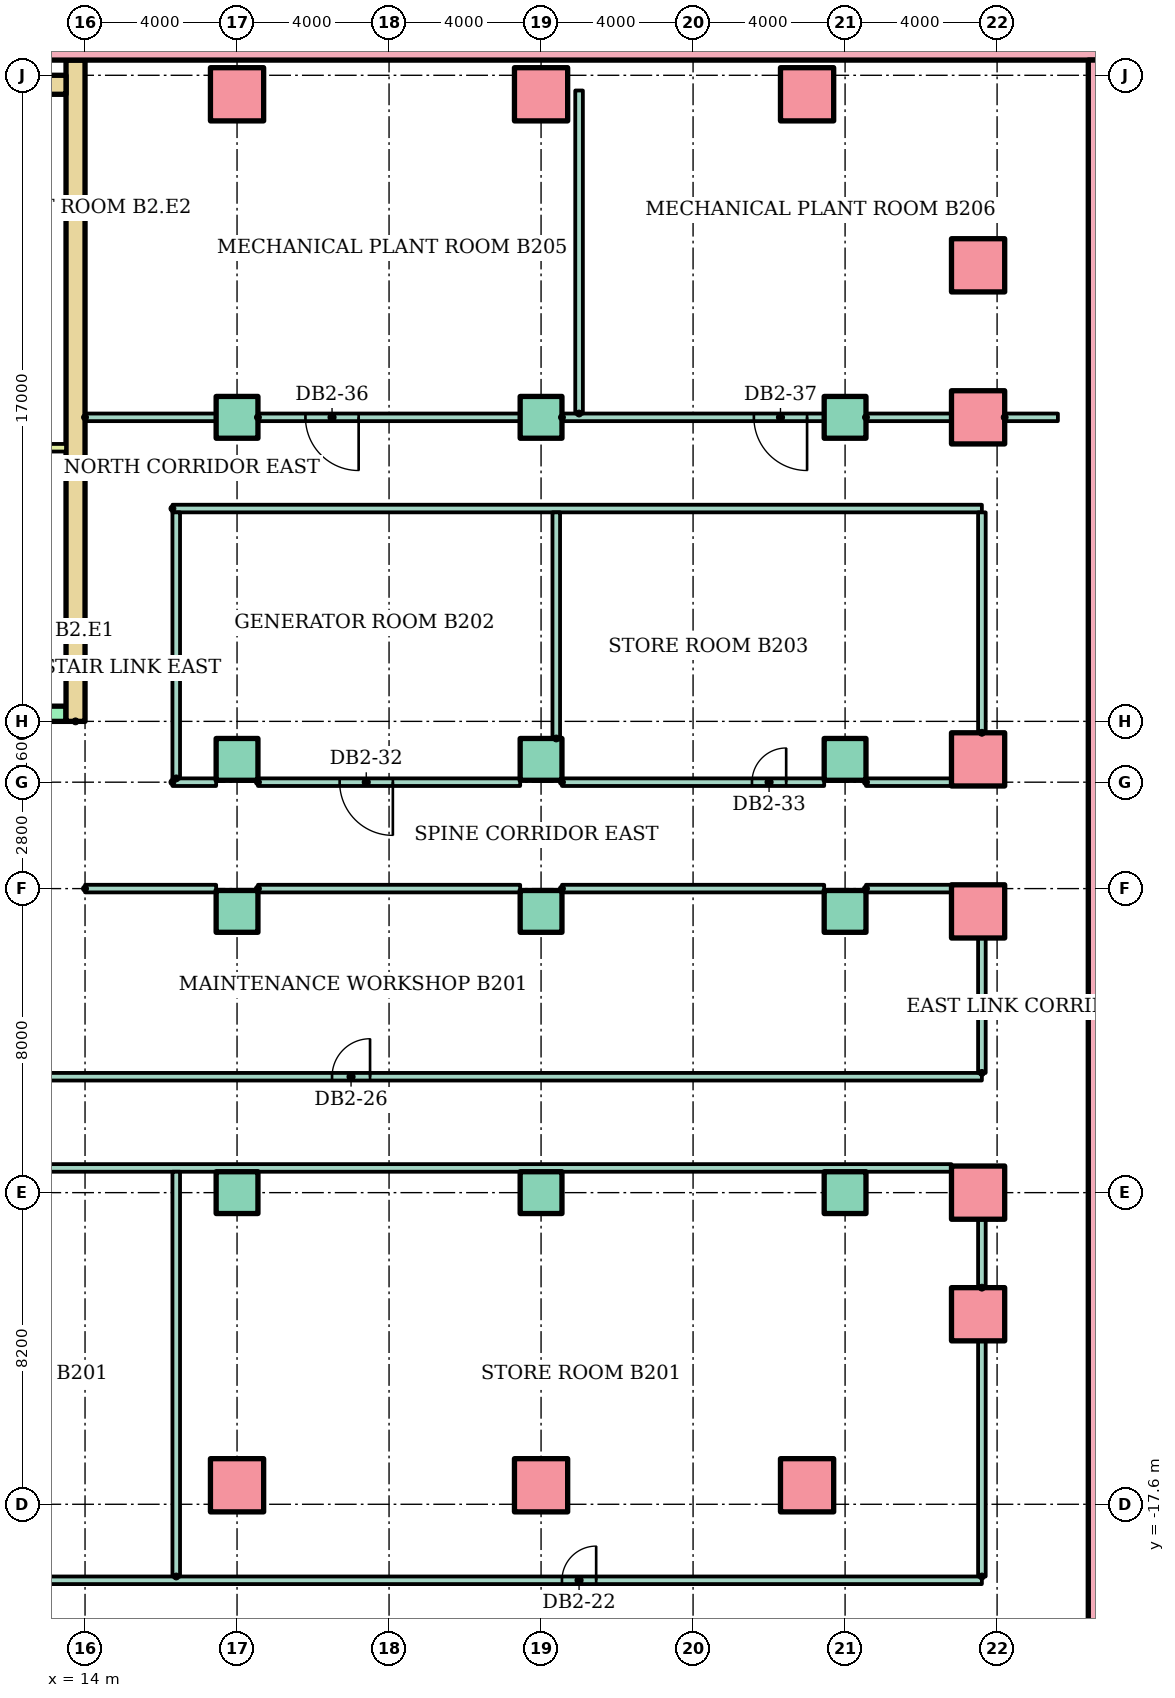
"""IFC4 building model, lengths in metres.
Left out: names, types, materials, properties, quantities, classifications, styles, units other than length and angle.
Written with IfcOpenShell. Run it as: python <this file> out.ifc"""

import sys

from ifc_helpers import new_model, si_unit, direction, frame, frame_2d, origin, origin_2d, place, context, subcontext, project, spatial, rectangle, hollow_rectangle, extrude, element, fill, save


model = new_model("IFC4")
c1 = context("Model", 3, precision=1e-05, world=origin(), true_north=direction((0.0, 1.0)))
c2 = subcontext(c1, "Body", "Model", "MODEL_VIEW")
j1 = project(units=[si_unit("LENGTHUNIT", "METRE"), si_unit("PLANEANGLEUNIT", "RADIAN")], contexts=[c1])
p1 = place(None, origin())
s1 = spatial("IfcSite", under=j1, at=p1, CompositionType="ELEMENT")
p2 = place(p1, origin())
s2 = spatial("IfcBuilding", under=s1, at=p2, CompositionType="ELEMENT")
p3 = place(p2, frame((0.0, 0.0, -10.0)))
s3 = spatial("IfcBuildingStorey", under=s2, at=p3, CompositionType="ELEMENT", Elevation=-10.0)
p4 = place(p3, frame((-41.0, 20.7, -0.3)))
e1 = element("IfcWall", 1, at=p4, inside=s3, PredefinedType="SOLIDWALL", context=c2, shape_type="SweptSolid", body=[
    extrude(rectangle(XDim=82.0, YDim=0.6, at=frame_2d((41.0, 0.0))), origin(), (0.0, 0.0, 1.0), 4.95),
])
p5 = place(p3, frame((40.7, -50.4, -0.3), z_axis=(0.0, 0.0, 1.0), x_axis=(0.0, 1.0, 0.0)))
e2 = element("IfcWall", 2, at=p5, inside=s3, PredefinedType="SOLIDWALL", context=c2, shape_type="SweptSolid", body=[
    extrude(rectangle(XDim=70.8, YDim=0.6, at=frame_2d((35.4, 0.0))), origin(), (0.0, 0.0, 1.0), 4.95),
])
for number, where in (
    (3, (18.0, -17.1, -0.3)),
    (4, (26.0, -17.1, -0.3)),
    (5, (33.0, -17.1, -0.3)),
    (6, (37.5, -12.6, -0.3)),
):
    element("IfcColumn", number, at=place(p3, frame(where)), inside=s3, PredefinedType="COLUMN", context=c2, shape_type="SweptSolid", body=[
        extrude(hollow_rectangle(XDim=1.4, YDim=1.4, WallThickness=0.08, at=origin_2d()), origin(), (0.0, 0.0, 1.0), 5.3),
    ])
for number, where in (
    (7, (18.0, -9.4, -0.3)),
    (8, (26.0, -9.4, -0.3)),
    (9, (34.0, -9.4, -0.3)),
):
    element("IfcColumn", number, at=place(p3, frame(where)), inside=s3, PredefinedType="COLUMN", context=c2, shape_type="SweptSolid", body=[
        extrude(rectangle(XDim=1.1, YDim=1.1, at=origin_2d()), origin(), (0.0, 0.0, 1.0), 5.3),
    ])
p6 = place(p3, frame((37.5, -9.4, -0.3)))
e10 = element("IfcColumn", 10, at=p6, inside=s3, PredefinedType="COLUMN", context=c2, shape_type="SweptSolid", body=[
    extrude(hollow_rectangle(XDim=1.4, YDim=1.4, WallThickness=0.08, at=origin_2d()), origin(), (0.0, 0.0, 1.0), 5.3),
])
for number, where in (
    (11, (18.0, -2.0, -0.3)),
    (12, (26.0, -2.0, -0.3)),
    (13, (34.0, -2.0, -0.3)),
):
    element("IfcColumn", number, at=place(p3, frame(where)), inside=s3, PredefinedType="COLUMN", context=c2, shape_type="SweptSolid", body=[
        extrude(rectangle(XDim=1.1, YDim=1.1, at=origin_2d()), origin(), (0.0, 0.0, 1.0), 5.3),
    ])
p7 = place(p3, frame((37.5, -2.0, -0.3)))
e14 = element("IfcColumn", 14, at=p7, inside=s3, PredefinedType="COLUMN", context=c2, shape_type="SweptSolid", body=[
    extrude(hollow_rectangle(XDim=1.4, YDim=1.4, WallThickness=0.08, at=origin_2d()), origin(), (0.0, 0.0, 1.0), 5.3),
])
for number, where in (
    (15, (18.0, 2.0, -0.3)),
    (16, (26.0, 2.0, -0.3)),
    (17, (34.0, 2.0, -0.3)),
):
    element("IfcColumn", number, at=place(p3, frame(where)), inside=s3, PredefinedType="COLUMN", context=c2, shape_type="SweptSolid", body=[
        extrude(rectangle(XDim=1.1, YDim=1.1, at=origin_2d()), origin(), (0.0, 0.0, 1.0), 5.3),
    ])
p8 = place(p3, frame((37.5, 2.0, -0.3)))
e18 = element("IfcColumn", 18, at=p8, inside=s3, PredefinedType="COLUMN", context=c2, shape_type="SweptSolid", body=[
    extrude(hollow_rectangle(XDim=1.4, YDim=1.4, WallThickness=0.08, at=origin_2d()), origin(), (0.0, 0.0, 1.0), 5.3),
])
for number, where in (
    (19, (18.0, 11.0, -0.3)),
    (20, (26.0, 11.0, -0.3)),
    (21, (34.0, 11.0, -0.3)),
):
    element("IfcColumn", number, at=place(p3, frame(where)), inside=s3, PredefinedType="COLUMN", context=c2, shape_type="SweptSolid", body=[
        extrude(rectangle(XDim=1.1, YDim=1.1, at=origin_2d()), origin(), (0.0, 0.0, 1.0), 5.3),
    ])
for number, where in (
    (22, (37.5, 11.0, -0.3)),
    (23, (37.5, 15.0, -0.3)),
    (24, (18.0, 19.5, -0.3)),
    (25, (26.0, 19.5, -0.3)),
    (26, (33.0, 19.5, -0.3)),
):
    element("IfcColumn", number, at=place(p3, frame(where)), inside=s3, PredefinedType="COLUMN", context=c2, shape_type="SweptSolid", body=[
        extrude(hollow_rectangle(XDim=1.4, YDim=1.4, WallThickness=0.08, at=origin_2d()), origin(), (0.0, 0.0, 1.0), 5.3),
    ])
p9 = place(p3, frame((13.75, 3.0, 0.0), z_axis=(0.0, 0.0, 1.0), x_axis=(0.0, 1.0, 0.0)))
e27 = element("IfcWall", 27, at=p9, inside=s3, PredefinedType="SHEAR", context=c2, shape_type="SweptSolid", body=[
    extrude(rectangle(XDim=17.4, YDim=0.5, at=frame_2d((8.7, 0.0))), origin(), (0.0, 0.0, 1.0), 4.65),
])
p10 = place(p3, frame((-13.5, 19.75, 0.0)))
e28 = element("IfcWall", 28, at=p10, inside=s3, PredefinedType="SHEAR", context=c2, shape_type="SweptSolid", body=[
    extrude(rectangle(XDim=27.0, YDim=0.5, at=frame_2d((13.5, 0.0))), origin(), (0.0, 0.0, 1.0), 4.65),
])
p11 = place(p3, frame((-13.5, 3.2, 0.0)))
e29 = element("IfcWall", 29, at=p11, inside=s3, PredefinedType="SHEAR", context=c2, shape_type="SweptSolid", body=[
    extrude(rectangle(XDim=27.0, YDim=0.4, at=frame_2d((13.5, 0.0))), origin(), (0.0, 0.0, 1.0), 4.65),
])
p12 = place(p11, frame((12.6, 0.0, 0.0)))
e30 = element("IfcOpeningElement", 30, at=p12, cuts=e29, PredefinedType="OPENING", context=c2, shape_type="SweptSolid", body=[
    extrude(rectangle(XDim=1.8, YDim=2.1, at=frame_2d((0.9, 1.05))), frame((0.0, 0.21, 0.0), z_axis=(0.0, -1.0, 0.0), x_axis=(1.0, 0.0, 0.0)), (0.0, 0.0, 1.0), 0.42),
])
p13 = place(p3, frame((9.6, 10.2, 0.0)))
e31 = element("IfcWall", 31, at=p13, inside=s3, PredefinedType="PARTITIONING", context=c2, shape_type="SweptSolid", body=[
    extrude(rectangle(XDim=3.9, YDim=0.2, at=frame_2d((1.95, 0.0))), origin(), (0.0, 0.0, 1.0), 4.65),
])
p14 = place(p3, frame((-37.6, -19.6, 0.0)))
e32 = element("IfcWall", 32, at=p14, inside=s3, PredefinedType="PARTITIONING", context=c2, shape_type="SweptSolid", body=[
    extrude(rectangle(XDim=75.2, YDim=0.2, at=frame_2d((37.6, 0.0))), origin(), (0.0, 0.0, 1.0), 4.65),
])
p15 = place(p14, frame((9.3, 0.0, 0.0)))
e33 = element("IfcOpeningElement", 33, at=p15, cuts=e32, PredefinedType="OPENING", context=c2, shape_type="SweptSolid", body=[
    extrude(rectangle(XDim=1.4, YDim=2.1, at=frame_2d((0.7, 1.05))), frame((0.0, 0.11, 0.0), z_axis=(0.0, -1.0, 0.0), x_axis=(1.0, 0.0, 0.0)), (0.0, 0.0, 1.0), 0.22),
])
p16 = place(p14, frame((29.3, 0.0, 0.0)))
e34 = element("IfcOpeningElement", 34, at=p16, cuts=e32, PredefinedType="OPENING", context=c2, shape_type="SweptSolid", body=[
    extrude(rectangle(XDim=1.4, YDim=2.1, at=frame_2d((0.7, 1.05))), frame((0.0, 0.11, 0.0), z_axis=(0.0, -1.0, 0.0), x_axis=(1.0, 0.0, 0.0)), (0.0, 0.0, 1.0), 0.22),
])
p17 = place(p14, frame((46.5, 0.0, 0.0)))
e35 = element("IfcOpeningElement", 35, at=p17, cuts=e32, PredefinedType="OPENING", context=c2, shape_type="SweptSolid", body=[
    extrude(rectangle(XDim=1.0, YDim=2.1, at=frame_2d((0.5, 1.05))), frame((0.0, 0.11, 0.0), z_axis=(0.0, -1.0, 0.0), x_axis=(1.0, 0.0, 0.0)), (0.0, 0.0, 1.0), 0.22),
])
p18 = place(p14, frame((64.15, 0.0, 0.0)))
e36 = element("IfcOpeningElement", 36, at=p18, cuts=e32, PredefinedType="OPENING", context=c2, shape_type="SweptSolid", body=[
    extrude(rectangle(XDim=0.9, YDim=2.1, at=frame_2d((0.45, 1.05))), frame((0.0, 0.11, 0.0), z_axis=(0.0, -1.0, 0.0), x_axis=(1.0, 0.0, 0.0)), (0.0, 0.0, 1.0), 0.22),
])
p19 = place(p3, frame((-36.8, -8.75, 0.0)))
e37 = element("IfcWall", 37, at=p19, inside=s3, PredefinedType="PARTITIONING", context=c2, shape_type="SweptSolid", body=[
    extrude(rectangle(XDim=73.6, YDim=0.2, at=frame_2d((36.8, 0.0))), origin(), (0.0, 0.0, 1.0), 4.65),
])
p20 = place(p3, frame((-37.6, -6.35, 0.0)))
e38 = element("IfcWall", 38, at=p20, inside=s3, PredefinedType="PARTITIONING", context=c2, shape_type="SweptSolid", body=[
    extrude(rectangle(XDim=75.2, YDim=0.2, at=frame_2d((37.6, 0.0))), origin(), (0.0, 0.0, 1.0), 4.65),
])
p21 = place(p20, frame((6.5, 0.0, 0.0)))
e39 = element("IfcOpeningElement", 39, at=p21, cuts=e38, PredefinedType="OPENING", context=c2, shape_type="SweptSolid", body=[
    extrude(rectangle(XDim=1.0, YDim=2.1, at=frame_2d((0.5, 1.05))), frame((0.0, 0.11, 0.0), z_axis=(0.0, -1.0, 0.0), x_axis=(1.0, 0.0, 0.0)), (0.0, 0.0, 1.0), 0.22),
])
p22 = place(p20, frame((20.5, 0.0, 0.0)))
e40 = element("IfcOpeningElement", 40, at=p22, cuts=e38, PredefinedType="OPENING", context=c2, shape_type="SweptSolid", body=[
    extrude(rectangle(XDim=1.0, YDim=2.1, at=frame_2d((0.5, 1.05))), frame((0.0, 0.11, 0.0), z_axis=(0.0, -1.0, 0.0), x_axis=(1.0, 0.0, 0.0)), (0.0, 0.0, 1.0), 0.22),
])
p23 = place(p20, frame((34.55, 0.0, 0.0)))
e41 = element("IfcOpeningElement", 41, at=p23, cuts=e38, PredefinedType="OPENING", context=c2, shape_type="SweptSolid", body=[
    extrude(rectangle(XDim=0.9, YDim=2.1, at=frame_2d((0.45, 1.05))), frame((0.0, 0.11, 0.0), z_axis=(0.0, -1.0, 0.0), x_axis=(1.0, 0.0, 0.0)), (0.0, 0.0, 1.0), 0.22),
])
p24 = place(p20, frame((58.1, 0.0, 0.0)))
e42 = element("IfcOpeningElement", 42, at=p24, cuts=e38, PredefinedType="OPENING", context=c2, shape_type="SweptSolid", body=[
    extrude(rectangle(XDim=1.0, YDim=2.1, at=frame_2d((0.5, 1.05))), frame((0.0, 0.11, 0.0), z_axis=(0.0, -1.0, 0.0), x_axis=(1.0, 0.0, 0.0)), (0.0, 0.0, 1.0), 0.22),
])
p25 = place(p3, frame((14.0, -1.4, 0.0)))
e43 = element("IfcWall", 43, at=p25, inside=s3, PredefinedType="PARTITIONING", context=c2, shape_type="SweptSolid", body=[
    extrude(rectangle(XDim=3.45, YDim=0.2, at=frame_2d((1.725, 0.0))), origin(), (0.0, 0.0, 1.0), 4.65),
])
for number, where in (
    (44, (18.55, -1.4, 0.0)),
    (45, (26.55, -1.4, 0.0)),
):
    element("IfcWall", number, at=place(p3, frame(where)), inside=s3, PredefinedType="PARTITIONING", context=c2, shape_type="SweptSolid", body=[
        extrude(rectangle(XDim=6.9, YDim=0.2, at=frame_2d((3.45, 0.0))), origin(), (0.0, 0.0, 1.0), 4.65),
    ])
p26 = place(p3, frame((34.55, -1.4, 0.0)))
e46 = element("IfcWall", 46, at=p26, inside=s3, PredefinedType="PARTITIONING", context=c2, shape_type="SweptSolid", body=[
    extrude(rectangle(XDim=2.25, YDim=0.2, at=frame_2d((1.125, 0.0))), origin(), (0.0, 0.0, 1.0), 4.65),
])
p27 = place(p3, frame((16.3, 1.4, 0.0)))
e47 = element("IfcWall", 47, at=p27, inside=s3, PredefinedType="PARTITIONING", context=c2, shape_type="SweptSolid", body=[
    extrude(rectangle(XDim=1.15, YDim=0.2, at=frame_2d((0.575, 0.0))), origin(), (0.0, 0.0, 1.0), 4.65),
])
p28 = place(p3, frame((18.55, 1.4, 0.0)))
e48 = element("IfcWall", 48, at=p28, inside=s3, PredefinedType="PARTITIONING", context=c2, shape_type="SweptSolid", body=[
    extrude(rectangle(XDim=6.9, YDim=0.2, at=frame_2d((3.45, 0.0))), origin(), (0.0, 0.0, 1.0), 4.65),
])
p29 = place(p28, frame((2.15, 0.0, 0.0)))
e49 = element("IfcOpeningElement", 49, at=p29, cuts=e48, PredefinedType="OPENING", context=c2, shape_type="SweptSolid", body=[
    extrude(rectangle(XDim=1.4, YDim=2.1, at=frame_2d((0.7, 1.05))), frame((0.0, 0.11, 0.0), z_axis=(0.0, -1.0, 0.0), x_axis=(1.0, 0.0, 0.0)), (0.0, 0.0, 1.0), 0.22),
])
p30 = place(p3, frame((26.55, 1.4, 0.0)))
e50 = element("IfcWall", 50, at=p30, inside=s3, PredefinedType="PARTITIONING", context=c2, shape_type="SweptSolid", body=[
    extrude(rectangle(XDim=6.9, YDim=0.2, at=frame_2d((3.45, 0.0))), origin(), (0.0, 0.0, 1.0), 4.65),
])
p31 = place(p30, frame((5.0, 0.0, 0.0)))
e51 = element("IfcOpeningElement", 51, at=p31, cuts=e50, PredefinedType="OPENING", context=c2, shape_type="SweptSolid", body=[
    extrude(rectangle(XDim=0.9, YDim=2.1, at=frame_2d((0.45, 1.05))), frame((0.0, 0.11, 0.0), z_axis=(0.0, -1.0, 0.0), x_axis=(1.0, 0.0, 0.0)), (0.0, 0.0, 1.0), 0.22),
])
p32 = place(p3, frame((34.55, 1.4, 0.0)))
e52 = element("IfcWall", 52, at=p32, inside=s3, PredefinedType="PARTITIONING", context=c2, shape_type="SweptSolid", body=[
    extrude(rectangle(XDim=2.25, YDim=0.2, at=frame_2d((1.125, 0.0))), origin(), (0.0, 0.0, 1.0), 4.65),
])
p33 = place(p3, frame((16.3, 8.6, 0.0)))
e53 = element("IfcWall", 53, at=p33, inside=s3, PredefinedType="PARTITIONING", context=c2, shape_type="SweptSolid", body=[
    extrude(rectangle(XDim=21.3, YDim=0.2, at=frame_2d((10.65, 0.0))), origin(), (0.0, 0.0, 1.0), 4.65),
])
p34 = place(p3, frame((14.0, 11.0, 0.0)))
e54 = element("IfcWall", 54, at=p34, inside=s3, PredefinedType="PARTITIONING", context=c2, shape_type="SweptSolid", body=[
    extrude(rectangle(XDim=3.45, YDim=0.2, at=frame_2d((1.725, 0.0))), origin(), (0.0, 0.0, 1.0), 4.65),
])
p35 = place(p3, frame((18.55, 11.0, 0.0)))
e55 = element("IfcWall", 55, at=p35, inside=s3, PredefinedType="PARTITIONING", context=c2, shape_type="SweptSolid", body=[
    extrude(rectangle(XDim=6.9, YDim=0.2, at=frame_2d((3.45, 0.0))), origin(), (0.0, 0.0, 1.0), 4.65),
])
p36 = place(p35, frame((1.25, 0.0, 0.0)))
e56 = element("IfcOpeningElement", 56, at=p36, cuts=e55, PredefinedType="OPENING", context=c2, shape_type="SweptSolid", body=[
    extrude(rectangle(XDim=1.4, YDim=2.1, at=frame_2d((0.7, 1.05))), frame((0.0, 0.11, 0.0), z_axis=(0.0, -1.0, 0.0), x_axis=(1.0, 0.0, 0.0)), (0.0, 0.0, 1.0), 0.22),
])
p37 = place(p3, frame((26.55, 11.0, 0.0)))
e57 = element("IfcWall", 57, at=p37, inside=s3, PredefinedType="PARTITIONING", context=c2, shape_type="SweptSolid", body=[
    extrude(rectangle(XDim=6.9, YDim=0.2, at=frame_2d((3.45, 0.0))), origin(), (0.0, 0.0, 1.0), 4.65),
])
p38 = place(p37, frame((5.05, 0.0, 0.0)))
e58 = element("IfcOpeningElement", 58, at=p38, cuts=e57, PredefinedType="OPENING", context=c2, shape_type="SweptSolid", body=[
    extrude(rectangle(XDim=1.4, YDim=2.1, at=frame_2d((0.7, 1.05))), frame((0.0, 0.11, 0.0), z_axis=(0.0, -1.0, 0.0), x_axis=(1.0, 0.0, 0.0)), (0.0, 0.0, 1.0), 0.22),
])
p39 = place(p3, frame((34.55, 11.0, 0.0)))
e59 = element("IfcWall", 59, at=p39, inside=s3, PredefinedType="PARTITIONING", context=c2, shape_type="SweptSolid", body=[
    extrude(rectangle(XDim=2.25, YDim=0.2, at=frame_2d((1.125, 0.0))), origin(), (0.0, 0.0, 1.0), 4.65),
])
p40 = place(p3, frame((38.2, 11.0, 0.0)))
e60 = element("IfcWall", 60, at=p40, inside=s3, PredefinedType="PARTITIONING", context=c2, shape_type="SweptSolid", body=[
    extrude(rectangle(XDim=1.4, YDim=0.2, at=frame_2d((0.7, 0.0))), origin(), (0.0, 0.0, 1.0), 4.65),
])
p41 = place(p3, frame((16.4, -19.5, 0.0), z_axis=(0.0, 0.0, 1.0), x_axis=(0.0, 1.0, 0.0)))
e61 = element("IfcWall", 61, at=p41, inside=s3, PredefinedType="PARTITIONING", context=c2, shape_type="SweptSolid", body=[
    extrude(rectangle(XDim=10.65, YDim=0.2, at=frame_2d((5.325, 0.0))), origin(), (0.0, 0.0, 1.0), 4.65),
])
p42 = place(p3, frame((16.4, 1.5, 0.0), z_axis=(0.0, 0.0, 1.0), x_axis=(0.0, 1.0, 0.0)))
e62 = element("IfcWall", 62, at=p42, inside=s3, PredefinedType="PARTITIONING", context=c2, shape_type="SweptSolid", body=[
    extrude(rectangle(XDim=7.0, YDim=0.2, at=frame_2d((3.5, 0.0))), origin(), (0.0, 0.0, 1.0), 4.65),
])
p43 = place(p3, frame((26.4, 2.55, 0.0), z_axis=(0.0, 0.0, 1.0), x_axis=(0.0, 1.0, 0.0)))
e63 = element("IfcWall", 63, at=p43, inside=s3, PredefinedType="PARTITIONING", context=c2, shape_type="SweptSolid", body=[
    extrude(rectangle(XDim=5.95, YDim=0.2, at=frame_2d((2.975, 0.0))), origin(), (0.0, 0.0, 1.0), 4.65),
])
p44 = place(p3, frame((27.0, 11.1, 0.0), z_axis=(0.0, 0.0, 1.0), x_axis=(0.0, 1.0, 0.0)))
e64 = element("IfcWall", 64, at=p44, inside=s3, PredefinedType="PARTITIONING", context=c2, shape_type="SweptSolid", body=[
    extrude(rectangle(XDim=8.5, YDim=0.2, at=frame_2d((4.25, 0.0))), origin(), (0.0, 0.0, 1.0), 4.65),
])
p45 = place(p3, frame((37.6, -19.5, 0.0), z_axis=(0.0, 0.0, 1.0), x_axis=(0.0, 1.0, 0.0)))
e65 = element("IfcWall", 65, at=p45, inside=s3, PredefinedType="PARTITIONING", context=c2, shape_type="SweptSolid", body=[
    extrude(rectangle(XDim=6.2, YDim=0.2, at=frame_2d((3.1, 0.0))), origin(), (0.0, 0.0, 1.0), 4.65),
])
p46 = place(p3, frame((37.6, -11.9, 0.0), z_axis=(0.0, 0.0, 1.0), x_axis=(0.0, 1.0, 0.0)))
e66 = element("IfcWall", 66, at=p46, inside=s3, PredefinedType="PARTITIONING", context=c2, shape_type="SweptSolid", body=[
    extrude(rectangle(XDim=1.8, YDim=0.2, at=frame_2d((0.9, 0.0))), origin(), (0.0, 0.0, 1.0), 4.65),
])
p47 = place(p3, frame((37.6, -6.25, 0.0), z_axis=(0.0, 0.0, 1.0), x_axis=(0.0, 1.0, 0.0)))
e67 = element("IfcWall", 67, at=p47, inside=s3, PredefinedType="PARTITIONING", context=c2, shape_type="SweptSolid", body=[
    extrude(rectangle(XDim=3.55, YDim=0.2, at=frame_2d((1.775, 0.0))), origin(), (0.0, 0.0, 1.0), 4.65),
])
p48 = place(p3, frame((37.6, 2.7, 0.0), z_axis=(0.0, 0.0, 1.0), x_axis=(0.0, 1.0, 0.0)))
e68 = element("IfcWall", 68, at=p48, inside=s3, PredefinedType="PARTITIONING", context=c2, shape_type="SweptSolid", body=[
    extrude(rectangle(XDim=5.8, YDim=0.2, at=frame_2d((2.9, 0.0))), origin(), (0.0, 0.0, 1.0), 4.65),
])
p49 = place(p18, origin())
e69 = element("IfcDoor", 69, at=p49, inside=s3, OperationType="SINGLE_SWING_RIGHT", PredefinedType="DOOR", context=c2, shape_type="SweptSolid", body=[
    extrude(rectangle(XDim=0.9, YDim=2.1, at=frame_2d((0.45, 1.05))), frame((0.0, 0.025, 0.0), z_axis=(0.0, -1.0, 0.0), x_axis=(1.0, 0.0, 0.0)), (0.0, 0.0, 1.0), 0.05),
])
fill(e36, e69)
p50 = place(p24, origin())
e70 = element("IfcDoor", 70, at=p50, inside=s3, OperationType="SINGLE_SWING_RIGHT", PredefinedType="DOOR", context=c2, shape_type="SweptSolid", body=[
    extrude(rectangle(XDim=1.0, YDim=2.1, at=frame_2d((0.5, 1.05))), frame((0.0, 0.025, 0.0), z_axis=(0.0, -1.0, 0.0), x_axis=(1.0, 0.0, 0.0)), (0.0, 0.0, 1.0), 0.05),
])
fill(e42, e70)
p51 = place(p29, frame((1.4, 0.0, 0.0), z_axis=(0.0, 0.0, 1.0), x_axis=(-1.0, 0.0, 0.0)))
e71 = element("IfcDoor", 71, at=p51, inside=s3, OperationType="DOUBLE_DOOR_SINGLE_SWING", PredefinedType="DOOR", context=c2, shape_type="SweptSolid", body=[
    extrude(rectangle(XDim=1.4, YDim=2.1, at=frame_2d((0.7, 1.05))), frame((0.0, 0.025, 0.0), z_axis=(0.0, -1.0, 0.0), x_axis=(1.0, 0.0, 0.0)), (0.0, 0.0, 1.0), 0.05),
])
fill(e49, e71)
p52 = place(p31, origin())
e72 = element("IfcDoor", 72, at=p52, inside=s3, OperationType="SINGLE_SWING_RIGHT", PredefinedType="DOOR", context=c2, shape_type="SweptSolid", body=[
    extrude(rectangle(XDim=0.9, YDim=2.1, at=frame_2d((0.45, 1.05))), frame((0.0, 0.025, 0.0), z_axis=(0.0, -1.0, 0.0), x_axis=(1.0, 0.0, 0.0)), (0.0, 0.0, 1.0), 0.05),
])
fill(e51, e72)
p53 = place(p36, frame((1.4, 0.0, 0.0), z_axis=(0.0, 0.0, 1.0), x_axis=(-1.0, 0.0, 0.0)))
e73 = element("IfcDoor", 73, at=p53, inside=s3, OperationType="DOUBLE_DOOR_SINGLE_SWING", PredefinedType="DOOR", context=c2, shape_type="SweptSolid", body=[
    extrude(rectangle(XDim=1.4, YDim=2.1, at=frame_2d((0.7, 1.05))), frame((0.0, 0.025, 0.0), z_axis=(0.0, -1.0, 0.0), x_axis=(1.0, 0.0, 0.0)), (0.0, 0.0, 1.0), 0.05),
])
fill(e56, e73)
p54 = place(p38, frame((1.4, 0.0, 0.0), z_axis=(0.0, 0.0, 1.0), x_axis=(-1.0, 0.0, 0.0)))
e74 = element("IfcDoor", 74, at=p54, inside=s3, OperationType="DOUBLE_DOOR_SINGLE_SWING", PredefinedType="DOOR", context=c2, shape_type="SweptSolid", body=[
    extrude(rectangle(XDim=1.4, YDim=2.1, at=frame_2d((0.7, 1.05))), frame((0.0, 0.025, 0.0), z_axis=(0.0, -1.0, 0.0), x_axis=(1.0, 0.0, 0.0)), (0.0, 0.0, 1.0), 0.05),
])
fill(e58, e74)
save(model, sys.argv[1])
